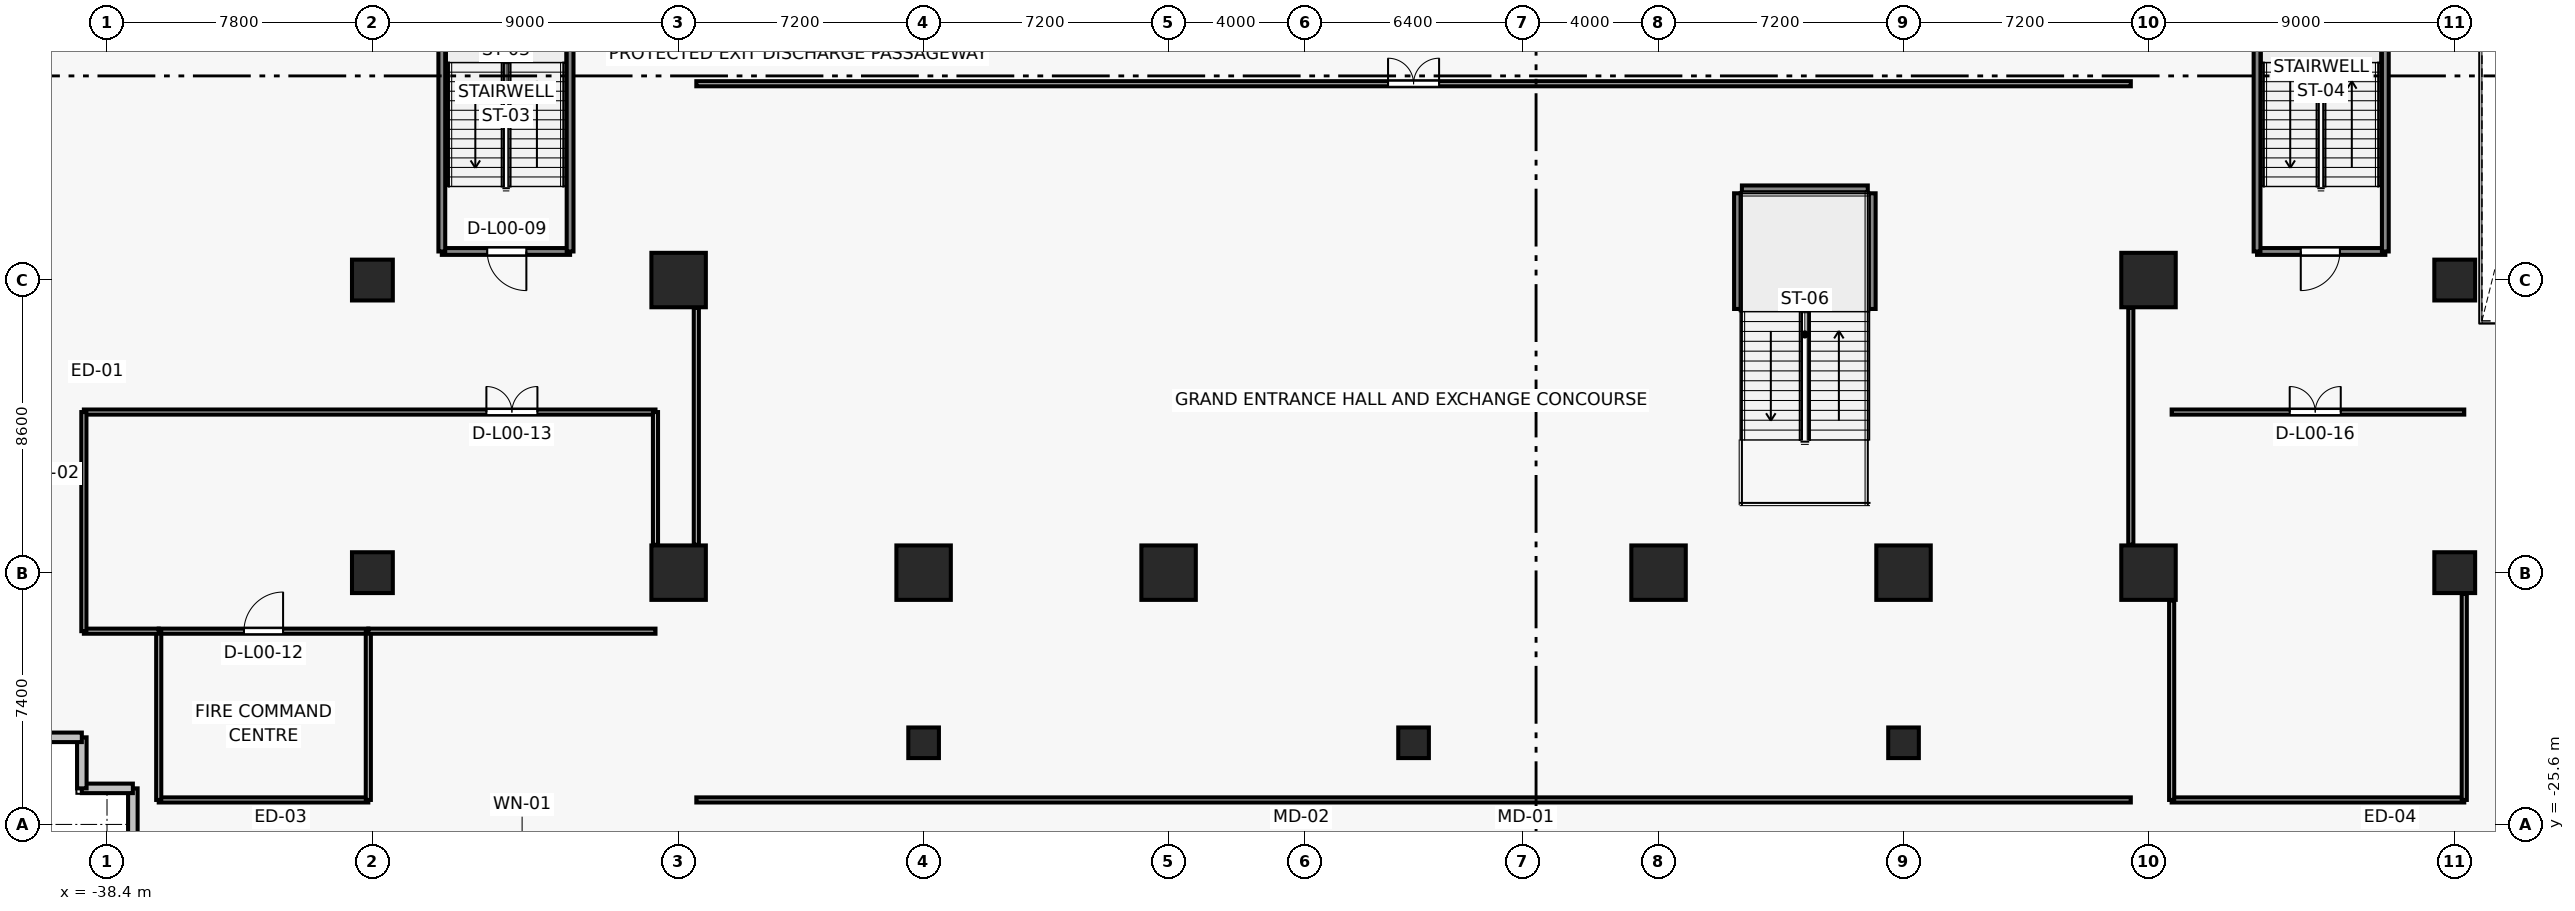
"""IFC4 building model, lengths in metres.
Left out: names, types, materials, properties, quantities, classifications, styles, units other than length and angle.
Written with IfcOpenShell. Run it as: python <this file> out.ifc"""

import sys

from ifc_helpers import new_model, si_unit, direction, frame, frame_2d, origin, origin_2d, place, context, subcontext, project, spatial, rectangle, extrude, source, transform, mapped, element, fill, save


model = new_model("IFC4")
c1 = context("Model", 3, precision=1e-05, world=origin(), true_north=direction((0.0, 1.0)))
c2 = subcontext(c1, "Body", "Model", "MODEL_VIEW")
j1 = project(units=[si_unit("LENGTHUNIT", "METRE"), si_unit("PLANEANGLEUNIT", "RADIAN")], contexts=[c1])
p1 = place(None, origin())
s1 = spatial("IfcSite", under=j1, at=p1, CompositionType="ELEMENT")
p2 = place(p1, origin())
s2 = spatial("IfcBuilding", under=s1, at=p2, CompositionType="ELEMENT")
p3 = place(p2, origin())
s3 = spatial("IfcBuildingStorey", under=s2, at=p3, CompositionType="ELEMENT", Elevation=0.0)
for number, where, z_axis, x_axis in (
    (1, (-21.6, -18.2, 0.0), (0.0, 0.0, 1.0), (1.0, 0.0, 0.0)),
    (2, (-14.4, -18.2, 0.0), (0.0, 0.0, 1.0), (1.0, 0.0, 0.0)),
    (3, (-7.2, -18.2, 0.0), (0.0, 0.0, 1.0), (1.0, 0.0, 0.0)),
    (4, (7.2, -18.2, 0.0), (0.0, 0.0, 1.0), (1.0, 0.0, 0.0)),
    (5, (14.4, -18.2, 0.0), (0.0, 0.0, 1.0), (1.0, 0.0, 0.0)),
    (6, (21.6, -18.2, 0.0), (0.0, 0.0, 1.0), (1.0, 0.0, 0.0)),
    (7, (-21.6, -9.6, 0.0), (0.0, 0.0, 1.0), (1.0, 0.0, 0.0)),
    (8, (21.6, -9.6, 0.0), (0.0, 0.0, 1.0), (1.0, 0.0, 0.0)),
):
    element("IfcColumn", number, at=place(p3, frame(where, z_axis=z_axis, x_axis=x_axis)), inside=s3, PredefinedType="COLUMN", context=c2, shape_type="SweptSolid", body=[
        extrude(rectangle(XDim=1.6, YDim=1.6, at=origin_2d()), origin(), (0.0, 0.0, 1.0), 5.0),
    ])
for number, where, z_axis, x_axis in (
    (9, (-30.6, -18.2, 0.0), (0.0, 0.0, 1.0), (1.0, 0.0, 0.0)),
    (10, (-30.6, -9.6, 0.0), (0.0, 0.0, 1.0), (1.0, 0.0, 0.0)),
    (11, (30.6, -18.2, 0.0), (0.0, 0.0, 1.0), (1.0, 0.0, 0.0)),
    (12, (30.6, -9.6, 0.0), (0.0, 0.0, 1.0), (1.0, 0.0, 0.0)),
):
    element("IfcColumn", number, at=place(p3, frame(where, z_axis=z_axis, x_axis=x_axis)), inside=s3, PredefinedType="COLUMN", context=c2, shape_type="SweptSolid", body=[
        extrude(rectangle(XDim=1.2, YDim=1.2, at=origin_2d()), origin(), (0.0, 0.0, 1.0), 5.0),
    ])
for number, where, z_axis, x_axis in (
    (13, (-14.4, -23.2, 0.0), (0.0, 0.0, 1.0), (1.0, 0.0, 0.0)),
    (14, (0.0, -23.2, 0.0), (0.0, 0.0, 1.0), (1.0, 0.0, 0.0)),
    (15, (14.4, -23.2, 0.0), (0.0, 0.0, 1.0), (1.0, 0.0, 0.0)),
):
    element("IfcColumn", number, at=place(p3, frame(where, z_axis=z_axis, x_axis=x_axis)), inside=s3, PredefinedType="COLUMN", context=c2, shape_type="SweptSolid", body=[
        extrude(rectangle(XDim=0.9, YDim=0.9, at=origin_2d()), origin(), (0.0, 0.0, 1.0), 5.0),
    ])
for number, where, z_axis, x_axis in (
    (16, (-37.64, -24.54, 0.0), (0.0, 0.0, 1.0), (0.0, -1.0, 0.0)),
    (17, (-39.14, -24.54, 0.0), (0.0, 0.0, 1.0), (1.0, 0.0, 0.0)),
    (18, (-39.14, -23.04, 0.0), (0.0, 0.0, 1.0), (0.0, -1.0, 0.0)),
    (19, (-40.64, -23.04, 0.0), (0.0, 0.0, 1.0), (1.0, 0.0, 0.0)),
):
    element("IfcWall", number, at=place(p3, frame(where, z_axis=z_axis, x_axis=x_axis)), inside=s3, PredefinedType="SOLIDWALL", context=c2, shape_type="SweptSolid", body=[
        extrude(rectangle(XDim=1.5, YDim=0.28, at=frame_2d((0.75, 0.0))), origin(), (0.0, 0.0, 1.0), 4.7),
    ])
for number, where, z_axis, x_axis in (
    (20, (9.52, -10.45, 0.0), (0.0, 0.0, 1.0), (0.0, 1.0, 0.0)),
    (21, (13.48, -7.05, 0.0), (0.0, 0.0, 1.0), (0.0, -1.0, 0.0)),
):
    element("IfcWall", number, at=place(p3, frame(where, z_axis=z_axis, x_axis=x_axis)), inside=s3, PredefinedType="SOLIDWALL", context=c2, shape_type="SweptSolid", body=[
        extrude(rectangle(XDim=3.4, YDim=0.2, at=frame_2d((1.7, 0.0))), origin(), (0.0, 0.0, 1.0), 4.7),
    ])
p4 = place(p3, frame((9.65, -6.92, 0.0), z_axis=(0.0, 0.0, 1.0), x_axis=(1.0, 0.0, 0.0)))
e22 = element("IfcWall", 22, at=p4, inside=s3, PredefinedType="SOLIDWALL", context=c2, shape_type="SweptSolid", body=[
    extrude(rectangle(XDim=3.7, YDim=0.2, at=frame_2d((1.85, 0.0))), origin(), (0.0, 0.0, 1.0), 4.7),
])
p5 = place(p3, frame((-24.79, -8.76, 0.0), z_axis=(0.0, 0.0, 1.0), x_axis=(-1.0, 0.0, 0.0)))
e23 = element("IfcWall", 23, at=p5, inside=s3, PredefinedType="SOLIDWALL", context=c2, shape_type="SweptSolid", body=[
    extrude(rectangle(XDim=3.77, YDim=0.2, at=frame_2d((1.885, 0.0))), origin(), (0.0, 0.0, 1.0), 4.7),
])
p6 = place(p5, frame((1.285, 0.0, 0.0)))
e24 = element("IfcOpeningElement", 24, at=p6, cuts=e23, PredefinedType="OPENING", context=c2, shape_type="SweptSolid", body=[
    extrude(rectangle(XDim=1.15, YDim=2.15, at=frame_2d((0.575, 1.075))), frame((0.0, 0.11, 0.0), z_axis=(0.0, -1.0, 0.0), x_axis=(1.0, 0.0, 0.0)), (0.0, 0.0, 1.0), 0.22),
])
for number, where, z_axis, x_axis in (
    (25, (-28.56, -8.76, 0.0), (0.0, 0.0, 1.0), (0.0, 1.0, 0.0)),
    (26, (-24.79, 0.16, 0.0), (0.0, 0.0, 1.0), (0.0, -1.0, 0.0)),
):
    element("IfcWall", number, at=place(p3, frame(where, z_axis=z_axis, x_axis=x_axis)), inside=s3, PredefinedType="SOLIDWALL", context=c2, shape_type="SweptSolid", body=[
        extrude(rectangle(XDim=8.92, YDim=0.2, at=frame_2d((4.46, 0.0))), origin(), (0.0, 0.0, 1.0), 4.7),
    ])
p7 = place(p3, frame((28.56, -8.76, 0.0), z_axis=(0.0, 0.0, 1.0), x_axis=(-1.0, 0.0, 0.0)))
e27 = element("IfcWall", 27, at=p7, inside=s3, PredefinedType="SOLIDWALL", context=c2, shape_type="SweptSolid", body=[
    extrude(rectangle(XDim=3.77, YDim=0.2, at=frame_2d((1.885, 0.0))), origin(), (0.0, 0.0, 1.0), 4.7),
])
p8 = place(p7, frame((1.335, 0.0, 0.0)))
e28 = element("IfcOpeningElement", 28, at=p8, cuts=e27, PredefinedType="OPENING", context=c2, shape_type="SweptSolid", body=[
    extrude(rectangle(XDim=1.15, YDim=2.15, at=frame_2d((0.575, 1.075))), frame((0.0, 0.11, 0.0), z_axis=(0.0, -1.0, 0.0), x_axis=(1.0, 0.0, 0.0)), (0.0, 0.0, 1.0), 0.22),
])
for number, where, z_axis, x_axis in (
    (29, (24.79, -8.76, 0.0), (0.0, 0.0, 1.0), (0.0, 1.0, 0.0)),
    (30, (28.56, 0.16, 0.0), (0.0, 0.0, 1.0), (0.0, -1.0, 0.0)),
):
    element("IfcWall", number, at=place(p3, frame(where, z_axis=z_axis, x_axis=x_axis)), inside=s3, PredefinedType="SOLIDWALL", context=c2, shape_type="SweptSolid", body=[
        extrude(rectangle(XDim=8.92, YDim=0.2, at=frame_2d((4.46, 0.0))), origin(), (0.0, 0.0, 1.0), 4.7),
    ])
p9 = place(p3, frame((-30.72, -24.88, 0.0), z_axis=(0.0, 0.0, 1.0), x_axis=(-1.0, 0.0, 0.0)))
e31 = element("IfcWall", 31, at=p9, inside=s3, PredefinedType="PARTITIONING", context=c2, shape_type="SweptSolid", body=[
    extrude(rectangle(XDim=6.16, YDim=0.15, at=frame_2d((3.08, 0.0))), origin(), (0.0, 0.0, 1.0), 4.7),
])
p10 = place(p3, frame((-36.88, -19.92, 0.0), z_axis=(0.0, 0.0, 1.0), x_axis=(1.0, 0.0, 0.0)))
e32 = element("IfcWall", 32, at=p10, inside=s3, PredefinedType="PARTITIONING", context=c2, shape_type="SweptSolid", body=[
    extrude(rectangle(XDim=6.16, YDim=0.15, at=frame_2d((3.08, 0.0))), origin(), (0.0, 0.0, 1.0), 4.7),
])
p11 = place(p10, frame((2.505, 0.0, 0.0)))
e33 = element("IfcOpeningElement", 33, at=p11, cuts=e32, PredefinedType="OPENING", context=c2, shape_type="SweptSolid", body=[
    extrude(rectangle(XDim=1.15, YDim=2.15, at=frame_2d((0.575, 1.075))), frame((0.0, 0.085, 0.0), z_axis=(0.0, -1.0, 0.0), x_axis=(1.0, 0.0, 0.0)), (0.0, 0.0, 1.0), 0.17),
])
for number, where, z_axis, x_axis in (
    (34, (-36.88, -24.88, 0.0), (0.0, 0.0, 1.0), (0.0, 1.0, 0.0)),
    (35, (-30.72, -19.92, 0.0), (0.0, 0.0, 1.0), (0.0, -1.0, 0.0)),
):
    element("IfcWall", number, at=place(p3, frame(where, z_axis=z_axis, x_axis=x_axis)), inside=s3, PredefinedType="PARTITIONING", context=c2, shape_type="SweptSolid", body=[
        extrude(rectangle(XDim=4.96, YDim=0.15, at=frame_2d((2.48, 0.0))), origin(), (0.0, 0.0, 1.0), 4.7),
    ])
p12 = place(p3, frame((-36.88, -19.92, 0.0), z_axis=(0.0, 0.0, 1.0), x_axis=(-1.0, 0.0, 0.0)))
e36 = element("IfcWall", 36, at=p12, inside=s3, PredefinedType="PARTITIONING", context=c2, shape_type="SweptSolid", body=[
    extrude(rectangle(XDim=2.2, YDim=0.15, at=frame_2d((1.1, 0.0))), origin(), (0.0, 0.0, 1.0), 4.7),
])
p13 = place(p3, frame((-22.28, -19.92, 0.0), z_axis=(0.0, 0.0, 1.0), x_axis=(-1.0, 0.0, 0.0)))
e37 = element("IfcWall", 37, at=p13, inside=s3, PredefinedType="PARTITIONING", context=c2, shape_type="SweptSolid", body=[
    extrude(rectangle(XDim=8.44, YDim=0.15, at=frame_2d((4.22, 0.0))), origin(), (0.0, 0.0, 1.0), 4.7),
])
p14 = place(p3, frame((-39.08, -13.48, 0.0), z_axis=(0.0, 0.0, 1.0), x_axis=(1.0, 0.0, 0.0)))
e38 = element("IfcWall", 38, at=p14, inside=s3, PredefinedType="PARTITIONING", context=c2, shape_type="SweptSolid", body=[
    extrude(rectangle(XDim=16.8, YDim=0.15, at=frame_2d((8.4, 0.0))), origin(), (0.0, 0.0, 1.0), 3.79),
])
p15 = place(p14, frame((11.83, 0.0, 0.0)))
e39 = element("IfcOpeningElement", 39, at=p15, cuts=e38, PredefinedType="OPENING", context=c2, shape_type="SweptSolid", body=[
    extrude(rectangle(XDim=1.5, YDim=2.2, at=frame_2d((0.75, 1.1))), frame((0.0, 0.085, 0.0), z_axis=(0.0, -1.0, 0.0), x_axis=(1.0, 0.0, 0.0)), (0.0, 0.0, 1.0), 0.17),
])
p16 = place(p3, frame((-39.08, -19.92, 0.0), z_axis=(0.0, 0.0, 1.0), x_axis=(0.0, 1.0, 0.0)))
e40 = element("IfcWall", 40, at=p16, inside=s3, PredefinedType="PARTITIONING", context=c2, shape_type="SweptSolid", body=[
    extrude(rectangle(XDim=6.44, YDim=0.15, at=frame_2d((3.22, 0.0))), origin(), (0.0, 0.0, 1.0), 4.7),
])
p17 = place(p3, frame((-22.28, -13.48, 0.0), z_axis=(0.0, 0.0, 1.0), x_axis=(0.0, -1.0, 0.0)))
e41 = element("IfcWall", 41, at=p17, inside=s3, PredefinedType="PARTITIONING", context=c2, shape_type="SweptSolid", body=[
    extrude(rectangle(XDim=3.9, YDim=0.15, at=frame_2d((1.95, 0.0))), origin(), (0.0, 0.0, 1.0), 3.997),
])
p18 = place(p3, frame((21.08, -24.88, 0.0), z_axis=(0.0, 0.0, 1.0), x_axis=(-1.0, 0.0, 0.0)))
e42 = element("IfcWall", 42, at=p18, inside=s3, PredefinedType="PARTITIONING", context=c2, shape_type="SweptSolid", body=[
    extrude(rectangle(XDim=42.16, YDim=0.15, at=frame_2d((21.08, 0.0))), origin(), (0.0, 0.0, 1.0), 4.7),
])
p19 = place(p3, frame((-21.08, -3.83, 0.0), z_axis=(0.0, 0.0, 1.0), x_axis=(1.0, 0.0, 0.0)))
e43 = element("IfcWall", 43, at=p19, inside=s3, PredefinedType="PARTITIONING", context=c2, shape_type="SweptSolid", body=[
    extrude(rectangle(XDim=42.16, YDim=0.15, at=frame_2d((21.08, 0.0))), origin(), (0.0, 0.0, 1.0), 3.769),
])
p20 = place(p19, frame((20.33, 0.0, 0.0)))
e44 = element("IfcOpeningElement", 44, at=p20, cuts=e43, PredefinedType="OPENING", context=c2, shape_type="SweptSolid", body=[
    extrude(rectangle(XDim=1.5, YDim=2.2, at=frame_2d((0.75, 1.1))), frame((0.0, 0.085, 0.0), z_axis=(0.0, -1.0, 0.0), x_axis=(1.0, 0.0, 0.0)), (0.0, 0.0, 1.0), 0.17),
])
for number, where, z_axis, x_axis in (
    (45, (-21.08, -17.38, 0.0), (0.0, 0.0, 1.0), (0.0, 1.0, 0.0)),
    (46, (21.08, -10.42, 0.0), (0.0, 0.0, 1.0), (0.0, -1.0, 0.0)),
):
    element("IfcWall", number, at=place(p3, frame(where, z_axis=z_axis, x_axis=x_axis)), inside=s3, PredefinedType="PARTITIONING", context=c2, shape_type="SweptSolid", body=[
        extrude(rectangle(XDim=6.96, YDim=0.15, at=frame_2d((3.48, 0.0))), origin(), (0.0, 0.0, 1.0), 3.89),
    ])
p21 = place(p3, frame((30.88, -24.88, 0.0), z_axis=(0.0, 0.0, 1.0), x_axis=(-1.0, 0.0, 0.0)))
e47 = element("IfcWall", 47, at=p21, inside=s3, PredefinedType="PARTITIONING", context=c2, shape_type="SweptSolid", body=[
    extrude(rectangle(XDim=8.6, YDim=0.15, at=frame_2d((4.3, 0.0))), origin(), (0.0, 0.0, 1.0), 4.7),
])
p22 = place(p3, frame((22.28, -13.48, 0.0), z_axis=(0.0, 0.0, 1.0), x_axis=(1.0, 0.0, 0.0)))
e48 = element("IfcWall", 48, at=p22, inside=s3, PredefinedType="PARTITIONING", context=c2, shape_type="SweptSolid", body=[
    extrude(rectangle(XDim=8.6, YDim=0.15, at=frame_2d((4.3, 0.0))), origin(), (0.0, 0.0, 1.0), 3.79),
])
p23 = place(p22, frame((3.47, 0.0, 0.0)))
e49 = element("IfcOpeningElement", 49, at=p23, cuts=e48, PredefinedType="OPENING", context=c2, shape_type="SweptSolid", body=[
    extrude(rectangle(XDim=1.5, YDim=2.2, at=frame_2d((0.75, 1.1))), frame((0.0, 0.085, 0.0), z_axis=(0.0, -1.0, 0.0), x_axis=(1.0, 0.0, 0.0)), (0.0, 0.0, 1.0), 0.17),
])
p24 = place(p3, frame((22.28, -24.88, 0.0), z_axis=(0.0, 0.0, 1.0), x_axis=(0.0, 1.0, 0.0)))
e50 = element("IfcWall", 50, at=p24, inside=s3, PredefinedType="PARTITIONING", context=c2, shape_type="SweptSolid", body=[
    extrude(rectangle(XDim=5.86, YDim=0.15, at=frame_2d((2.93, 0.0))), origin(), (0.0, 0.0, 1.0), 4.7),
])
p25 = place(p3, frame((30.88, -18.82, 0.0), z_axis=(0.0, 0.0, 1.0), x_axis=(0.0, -1.0, 0.0)))
e51 = element("IfcWall", 51, at=p25, inside=s3, PredefinedType="PARTITIONING", context=c2, shape_type="SweptSolid", body=[
    extrude(rectangle(XDim=6.06, YDim=0.15, at=frame_2d((3.03, 0.0))), origin(), (0.0, 0.0, 1.0), 4.7),
])
m1 = source(origin(), c2, "Body", "SweptSolid", [
    extrude(rectangle(XDim=1.15, YDim=2.15, at=frame_2d((0.575, 1.075))), frame((0.0, 0.025, 0.0), z_axis=(0.0, -1.0, 0.0), x_axis=(1.0, 0.0, 0.0)), (0.0, 0.0, 1.0), 0.05),
])
p26 = place(p6, origin())
e52 = element("IfcDoor", 52, at=p26, inside=s3, OperationType="SINGLE_SWING_LEFT", PredefinedType="DOOR", context=c2, shape_type="MappedRepresentation", body=[
    mapped(m1, transform((0.0, 0.0, 0.0), x_axis=(1.0, 0.0, 0.0), y_axis=(0.0, 1.0, 0.0), z_axis=(0.0, 0.0, 1.0), scale=1.0)),
])
fill(e24, e52)
p27 = place(p8, origin())
e53 = element("IfcDoor", 53, at=p27, inside=s3, OperationType="SINGLE_SWING_RIGHT", PredefinedType="DOOR", context=c2, shape_type="MappedRepresentation", body=[
    mapped(m1, transform((0.0, 0.0, 0.0), x_axis=(1.0, 0.0, 0.0), y_axis=(0.0, 1.0, 0.0), z_axis=(0.0, 0.0, 1.0), scale=1.0)),
])
fill(e28, e53)
p28 = place(p11, origin())
e54 = element("IfcDoor", 54, at=p28, inside=s3, OperationType="SINGLE_SWING_RIGHT", PredefinedType="DOOR", context=c2, shape_type="MappedRepresentation", body=[
    mapped(m1, transform((0.0, 0.0, 0.0), x_axis=(1.0, 0.0, 0.0), y_axis=(0.0, 1.0, 0.0), z_axis=(0.0, 0.0, 1.0), scale=1.0)),
])
fill(e33, e54)
m2 = source(origin(), c2, "Body", "SweptSolid", [
    extrude(rectangle(XDim=1.5, YDim=2.2, at=frame_2d((0.75, 1.1))), frame((0.0, 0.025, 0.0), z_axis=(0.0, -1.0, 0.0), x_axis=(1.0, 0.0, 0.0)), (0.0, 0.0, 1.0), 0.05),
])
p29 = place(p15, origin())
e55 = element("IfcDoor", 55, at=p29, inside=s3, OperationType="DOUBLE_DOOR_SINGLE_SWING", PredefinedType="DOOR", context=c2, shape_type="MappedRepresentation", body=[
    mapped(m2, transform((0.0, 0.0, 0.0), x_axis=(1.0, 0.0, 0.0), y_axis=(0.0, 1.0, 0.0), z_axis=(0.0, 0.0, 1.0), scale=1.0)),
])
fill(e39, e55)
p30 = place(p20, origin())
e56 = element("IfcDoor", 56, at=p30, inside=s3, OperationType="DOUBLE_DOOR_SINGLE_SWING", PredefinedType="DOOR", context=c2, shape_type="MappedRepresentation", body=[
    mapped(m2, transform((0.0, 0.0, 0.0), x_axis=(1.0, 0.0, 0.0), y_axis=(0.0, 1.0, 0.0), z_axis=(0.0, 0.0, 1.0), scale=1.0)),
])
fill(e44, e56)
p31 = place(p23, origin())
e57 = element("IfcDoor", 57, at=p31, inside=s3, OperationType="DOUBLE_DOOR_SINGLE_SWING", PredefinedType="DOOR", context=c2, shape_type="MappedRepresentation", body=[
    mapped(m2, transform((0.0, 0.0, 0.0), x_axis=(1.0, 0.0, 0.0), y_axis=(0.0, 1.0, 0.0), z_axis=(0.0, 0.0, 1.0), scale=1.0)),
])
fill(e49, e57)
save(model, sys.argv[1])
